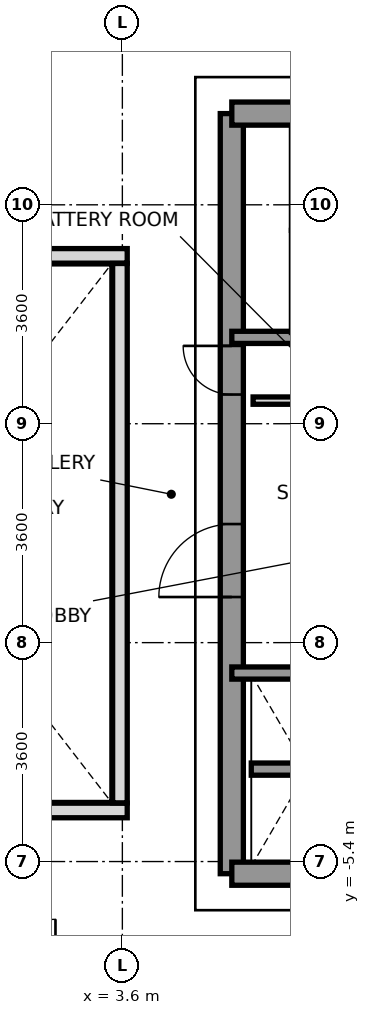
"""IFC4 building model, lengths in metres.
Left out: names, types, materials, properties, quantities, classifications, styles, units other than length and angle.
Written with IfcOpenShell. Run it as: python <this file> out.ifc"""

import sys

from ifc_helpers import new_model, si_unit, direction, frame, frame_2d, origin, place, context, subcontext, project, spatial, rectangle, extrude, source, transform, mapped, element, fill, save


model = new_model("IFC4")
c1 = context("Model", 3, precision=1e-05, world=origin(), true_north=direction((0.0, 1.0)))
c2 = subcontext(c1, "Body", "Model", "MODEL_VIEW")
j1 = project(units=[si_unit("LENGTHUNIT", "METRE"), si_unit("PLANEANGLEUNIT", "RADIAN")], contexts=[c1])
p1 = place(None, origin())
s1 = spatial("IfcSite", under=j1, at=p1, CompositionType="ELEMENT")
p2 = place(p1, origin())
s2 = spatial("IfcBuilding", under=s1, at=p2, CompositionType="ELEMENT")
p3 = place(p2, frame((0.0, 0.0, 170.6)))
s3 = spatial("IfcBuildingStorey", under=s2, at=p3, CompositionType="ELEMENT", Elevation=170.6)
p4 = place(p3, frame((5.4, -5.6, 0.0), z_axis=(0.0, 0.0, 1.0), x_axis=(0.0, 1.0, 0.0)))
e1 = element("IfcWall", 1, at=p4, inside=s3, PredefinedType="SHEAR", context=c2, shape_type="SweptSolid", body=[
    extrude(rectangle(XDim=12.5, YDim=0.38, at=frame_2d((6.25, 0.0))), origin(), (0.0, 0.0, 1.0), 3.2),
])
p5 = place(p4, frame((4.55, 0.0, 0.0)))
e2 = element("IfcOpeningElement", 2, at=p5, cuts=e1, PredefinedType="OPENING", context=c2, shape_type="SweptSolid", body=[
    extrude(rectangle(XDim=1.2, YDim=2.2, at=frame_2d((0.6, 1.1))), frame((0.0, 0.2, 0.0), z_axis=(0.0, -1.0, 0.0), x_axis=(1.0, 0.0, 0.0)), (0.0, 0.0, 1.0), 0.4),
])
p6 = place(p4, frame((7.88, 0.0, 0.0)))
e3 = element("IfcOpeningElement", 3, at=p6, cuts=e1, PredefinedType="OPENING", context=c2, shape_type="SweptSolid", body=[
    extrude(rectangle(XDim=0.8, YDim=2.1, at=frame_2d((0.4, 1.05))), frame((0.0, 0.2, 0.0), z_axis=(0.0, -1.0, 0.0), x_axis=(1.0, 0.0, 0.0)), (0.0, 0.0, 1.0), 0.4),
])
p7 = place(p3, frame((5.4, 6.9, 0.0), z_axis=(0.0, 0.0, 1.0), x_axis=(1.0, 0.0, 0.0)))
e4 = element("IfcWall", 4, at=p7, inside=s3, PredefinedType="SHEAR", context=c2, shape_type="SweptSolid", body=[
    extrude(rectangle(XDim=5.956, YDim=0.38, at=frame_2d((2.978, 0.0))), origin(), (0.0, 0.0, 1.0), 3.2),
])
p8 = place(p3, frame((5.4, -5.6, 0.0), z_axis=(0.0, 0.0, 1.0), x_axis=(1.0, 0.0, 0.0)))
e5 = element("IfcWall", 5, at=p8, inside=s3, PredefinedType="SHEAR", context=c2, shape_type="SweptSolid", body=[
    extrude(rectangle(XDim=7.8, YDim=0.38, at=frame_2d((3.9, 0.0))), origin(), (0.0, 0.0, 1.0), 3.2),
])
p9 = place(p8, frame((3.0, 0.0, 0.0)))
e6 = element("IfcOpeningElement", 6, at=p9, cuts=e5, PredefinedType="OPENING", context=c2, shape_type="SweptSolid", body=[
    extrude(rectangle(XDim=1.2, YDim=2.2, at=frame_2d((0.6, 1.1))), frame((0.0, 0.2, 0.0), z_axis=(0.0, -1.0, 0.0), x_axis=(1.0, 0.0, 0.0)), (0.0, 0.0, 1.0), 0.4),
])
p10 = place(p8, frame((5.85, 0.0, 0.0)))
e7 = element("IfcOpeningElement", 7, at=p10, cuts=e5, PredefinedType="OPENING", context=c2, shape_type="SweptSolid", body=[
    extrude(rectangle(XDim=0.8, YDim=2.1, at=frame_2d((0.4, 1.05))), frame((0.0, 0.2, 0.0), z_axis=(0.0, -1.0, 0.0), x_axis=(1.0, 0.0, 0.0)), (0.0, 0.0, 1.0), 0.4),
])
p11 = place(p3, frame((5.4, 3.22, 0.0), z_axis=(0.0, 0.0, 1.0), x_axis=(1.0, 0.0, 0.0)))
e8 = element("IfcWall", 8, at=p11, inside=s3, PredefinedType="SOLIDWALL", context=c2, shape_type="SweptSolid", body=[
    extrude(rectangle(XDim=2.78, YDim=0.2, at=frame_2d((1.39, 0.0))), origin(), (0.0, 0.0, 1.0), 3.2),
])
p12 = place(p3, frame((5.4, -2.3, 0.0), z_axis=(0.0, 0.0, 1.0), x_axis=(1.0, 0.0, 0.0)))
e9 = element("IfcWall", 9, at=p12, inside=s3, PredefinedType="SOLIDWALL", context=c2, shape_type="SweptSolid", body=[
    extrude(rectangle(XDim=3.08, YDim=0.2, at=frame_2d((1.54, 0.0))), origin(), (0.0, 0.0, 1.0), 3.2),
])
p13 = place(p3, frame((5.72, -3.88, 0.0), z_axis=(0.0, 0.0, 1.0), x_axis=(1.0, 0.0, 0.0)))
e10 = element("IfcWall", 10, at=p13, inside=s3, PredefinedType="SOLIDWALL", context=c2, shape_type="SweptSolid", body=[
    extrude(rectangle(XDim=1.84, YDim=0.2, at=frame_2d((0.92, 0.0))), origin(), (0.0, 0.0, 1.0), 3.2),
])
p14 = place(p3, frame((5.75, 2.18, 0.0), z_axis=(0.0, 0.0, 1.0), x_axis=(1.0, 0.0, 0.0)))
e11 = element("IfcWall", 11, at=p14, inside=s3, PredefinedType="PARTITIONING", context=c2, shape_type="SweptSolid", body=[
    extrude(rectangle(XDim=2.39, YDim=0.12, at=frame_2d((1.195, 0.0))), origin(), (0.0, 0.0, 1.0), 2.3),
])
for number, where, z_axis, x_axis in (
    (12, (-3.68, -4.56, 0.0), (0.0, 0.0, 1.0), (1.0, 0.0, 0.0)),
    (13, (-3.68, 4.56, 0.0), (0.0, 0.0, 1.0), (1.0, 0.0, 0.0)),
):
    element("IfcWall", number, at=place(p3, frame(where, z_axis=z_axis, x_axis=x_axis)), inside=s3, PredefinedType="PARAPET", context=c2, shape_type="SweptSolid", body=[
        extrude(rectangle(XDim=7.36, YDim=0.24, at=frame_2d((3.68, 0.0))), origin(), (0.0, 0.0, 1.0), 1.15),
    ])
p15 = place(p3, frame((3.56, -4.435, 0.0), z_axis=(0.0, 0.0, 1.0), x_axis=(0.0, 1.0, 0.0)))
e14 = element("IfcWall", 14, at=p15, inside=s3, PredefinedType="PARAPET", context=c2, shape_type="SweptSolid", body=[
    extrude(rectangle(XDim=8.87, YDim=0.24, at=frame_2d((4.435, 0.0))), origin(), (0.0, 0.0, 1.0), 1.15),
])
m1 = source(origin(), c2, "Body", "SweptSolid", [
    extrude(rectangle(XDim=1.2, YDim=2.2, at=frame_2d((0.6, 1.1))), frame((0.0, 0.025, 0.0), z_axis=(0.0, -1.0, 0.0), x_axis=(1.0, 0.0, 0.0)), (0.0, 0.0, 1.0), 0.05),
])
p16 = place(p5, origin())
e15 = element("IfcDoor", 15, at=p16, inside=s3, OperationType="SINGLE_SWING_LEFT", PredefinedType="DOOR", context=c2, shape_type="MappedRepresentation", body=[
    mapped(m1, transform((0.0, 0.0, 0.0), x_axis=(1.0, 0.0, 0.0), y_axis=(0.0, 1.0, 0.0), z_axis=(0.0, 0.0, 1.0), scale=1.0)),
])
fill(e2, e15)
m2 = source(origin(), c2, "Body", "SweptSolid", [
    extrude(rectangle(XDim=0.8, YDim=2.1, at=frame_2d((0.4, 1.05))), frame((0.0, 0.025, 0.0), z_axis=(0.0, -1.0, 0.0), x_axis=(1.0, 0.0, 0.0)), (0.0, 0.0, 1.0), 0.05),
])
p17 = place(p6, origin())
e16 = element("IfcDoor", 16, at=p17, inside=s3, OperationType="SINGLE_SWING_RIGHT", PredefinedType="DOOR", context=c2, shape_type="MappedRepresentation", body=[
    mapped(m2, transform((0.0, 0.0, 0.0), x_axis=(1.0, 0.0, 0.0), y_axis=(0.0, 1.0, 0.0), z_axis=(0.0, 0.0, 1.0), scale=1.0)),
])
fill(e3, e16)
save(model, sys.argv[1])
